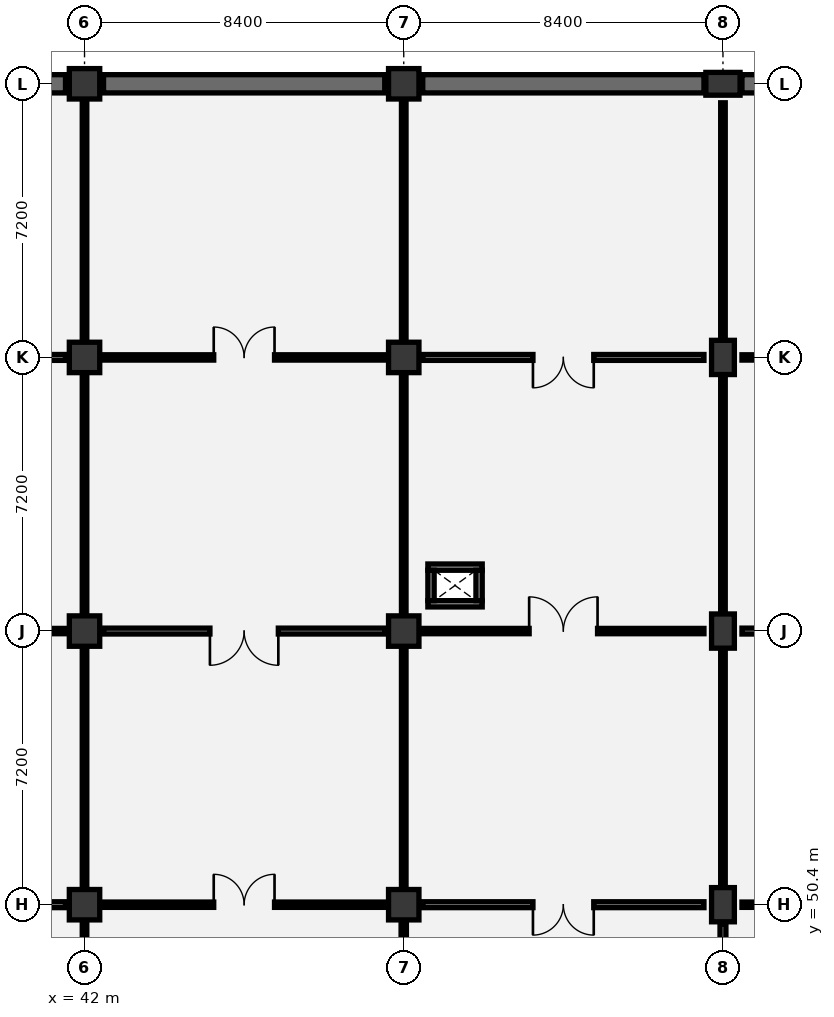
"""IFC4 building model, lengths in metres.
Left out: names, types, materials, properties, quantities, classifications, styles, units other than length and angle.
Written with IfcOpenShell. Run it as: python <this file> out.ifc"""

import sys

from ifc_helpers import new_model, si_unit, direction, frame, frame_2d, origin, origin_2d, place, context, subcontext, project, spatial, rectangle, extrude, element, fill, save


model = new_model("IFC4")
c1 = context("Model", 3, precision=1e-05, world=origin(), true_north=direction((0.0, 1.0)))
c2 = subcontext(c1, "Body", "Model", "MODEL_VIEW")
j1 = project(units=[si_unit("LENGTHUNIT", "METRE"), si_unit("PLANEANGLEUNIT", "RADIAN")], contexts=[c1])
p1 = place(None, origin())
s1 = spatial("IfcSite", under=j1, at=p1, CompositionType="ELEMENT")
p2 = place(p1, origin())
s2 = spatial("IfcBuilding", under=s1, at=p2, CompositionType="ELEMENT")
p3 = place(p2, frame((0.0, 0.0, -4.8)))
s3 = spatial("IfcBuildingStorey", under=s2, at=p3, CompositionType="ELEMENT", Elevation=-4.8)
for number, where, z_axis, x_axis in (
    (1, (42.0, 50.4, 0.0), (0.0, 0.0, 1.0), (1.0, 0.0, 0.0)),
    (2, (42.0, 57.6, 0.0), (0.0, 0.0, 1.0), (1.0, 0.0, 0.0)),
    (3, (42.0, 64.8, 0.0), (0.0, 0.0, 1.0), (1.0, 0.0, 0.0)),
    (4, (42.0, 72.0, 0.0), (0.0, 0.0, 1.0), (1.0, 0.0, 0.0)),
    (5, (50.4, 50.4, 0.0), (0.0, 0.0, 1.0), (1.0, 0.0, 0.0)),
    (6, (50.4, 57.6, 0.0), (0.0, 0.0, 1.0), (1.0, 0.0, 0.0)),
    (7, (50.4, 64.8, 0.0), (0.0, 0.0, 1.0), (1.0, 0.0, 0.0)),
    (8, (50.4, 72.0, 0.0), (0.0, 0.0, 1.0), (1.0, 0.0, 0.0)),
):
    element("IfcColumn", number, at=place(p3, frame(where, z_axis=z_axis, x_axis=x_axis)), inside=s3, PredefinedType="COLUMN", context=c2, shape_type="SweptSolid", body=[
        extrude(rectangle(XDim=0.8, YDim=0.8, at=origin_2d()), origin(), (0.0, 0.0, 1.0), 4.8),
    ])
for number, where, z_axis, x_axis in (
    (9, (58.8, 50.4, 0.0), (0.0, 0.0, 1.0), (1.0, 0.0, 0.0)),
    (10, (58.8, 57.6, 0.0), (0.0, 0.0, 1.0), (1.0, 0.0, 0.0)),
    (11, (58.8, 64.8, 0.0), (0.0, 0.0, 1.0), (1.0, 0.0, 0.0)),
    (12, (58.8, 72.0, 0.0), (0.0, 0.0, 1.0), (0.0, 1.0, 0.0)),
):
    element("IfcColumn", number, at=place(p3, frame(where, z_axis=z_axis, x_axis=x_axis)), inside=s3, PredefinedType="COLUMN", context=c2, shape_type="SweptSolid", body=[
        extrude(rectangle(XDim=0.6, YDim=0.9, at=origin_2d()), origin(), (0.0, 0.0, 1.0), 4.8),
    ])
for number, where, z_axis, x_axis in (
    (13, (34.1, 72.0, 0.0), (0.0, 0.0, 1.0), (1.0, 0.0, 0.0)),
    (14, (42.5, 72.0, 0.0), (0.0, 0.0, 1.0), (1.0, 0.0, 0.0)),
):
    element("IfcWall", number, at=place(p3, frame(where, z_axis=z_axis, x_axis=x_axis)), inside=s3, PredefinedType="USERDEFINED", context=c2, shape_type="SweptSolid", body=[
        extrude(rectangle(XDim=7.4, YDim=0.48, at=frame_2d((3.7, 0.0))), origin(), (0.0, 0.0, 1.0), 4.45),
    ])
p4 = place(p3, frame((50.9, 72.0, 0.0), z_axis=(0.0, 0.0, 1.0), x_axis=(1.0, 0.0, 0.0)))
e15 = element("IfcWall", 15, at=p4, inside=s3, PredefinedType="USERDEFINED", context=c2, shape_type="SweptSolid", body=[
    extrude(rectangle(XDim=7.4, YDim=0.48, at=frame_2d((3.7, 0.0))), origin(), (0.0, 0.0, 1.0), 4.45),
])
p5 = place(p3, frame((59.3, 72.0, 0.0), z_axis=(0.0, 0.0, 1.0), x_axis=(1.0, 0.0, 0.0)))
e16 = element("IfcWall", 16, at=p5, inside=s3, PredefinedType="USERDEFINED", context=c2, shape_type="SweptSolid", body=[
    extrude(rectangle(XDim=7.4, YDim=0.48, at=frame_2d((3.7, 0.0))), origin(), (0.0, 0.0, 1.0), 4.45),
])
for number, where, z_axis, x_axis in (
    (17, (51.035, 58.317, 0.0), (0.0, 0.0, 1.0), (1.0, 0.0, 0.0)),
    (18, (51.035, 59.282, 0.0), (0.0, 0.0, 1.0), (1.0, 0.0, 0.0)),
):
    element("IfcWall", number, at=place(p3, frame(where, z_axis=z_axis, x_axis=x_axis)), inside=s3, PredefinedType="PARTITIONING", context=c2, shape_type="SweptSolid", body=[
        extrude(rectangle(XDim=1.43, YDim=0.165, at=frame_2d((0.715, 0.0))), origin(), (0.0, 0.0, 1.0), 4.45),
    ])
for number, where, z_axis, x_axis in (
    (19, (51.117, 58.4, 0.0), (0.0, 0.0, 1.0), (0.0, 1.0, 0.0)),
    (20, (52.383, 58.4, 0.0), (0.0, 0.0, 1.0), (0.0, 1.0, 0.0)),
):
    element("IfcWall", number, at=place(p3, frame(where, z_axis=z_axis, x_axis=x_axis)), inside=s3, PredefinedType="PARTITIONING", context=c2, shape_type="SweptSolid", body=[
        extrude(rectangle(XDim=0.8, YDim=0.165, at=frame_2d((0.4, 0.0))), origin(), (0.0, 0.0, 1.0), 4.45),
    ])
p6 = place(p3, frame((42.0, 43.7, 0.0), z_axis=(0.0, 0.0, 1.0), x_axis=(0.0, 1.0, 0.0)))
e21 = element("IfcWall", 21, at=p6, inside=s3, PredefinedType="PARTITIONING", context=c2, shape_type="SweptSolid", body=[
    extrude(rectangle(XDim=6.2, YDim=0.12, at=frame_2d((3.1, 0.0))), origin(), (0.0, 0.0, 1.0), 3.645),
])
p7 = place(p3, frame((34.1, 50.4, 0.0), z_axis=(0.0, 0.0, 1.0), x_axis=(1.0, 0.0, 0.0)))
e22 = element("IfcWall", 22, at=p7, inside=s3, PredefinedType="PARTITIONING", context=c2, shape_type="SweptSolid", body=[
    extrude(rectangle(XDim=7.4, YDim=0.155, at=frame_2d((3.7, 0.0))), origin(), (0.0, 0.0, 1.0), 3.545),
])
p8 = place(p7, frame((2.9, 0.0, 0.0)))
e23 = element("IfcOpeningElement", 23, at=p8, cuts=e22, PredefinedType="OPENING", context=c2, shape_type="SweptSolid", body=[
    extrude(rectangle(XDim=1.6, YDim=2.2, at=frame_2d((0.8, 1.1))), frame((0.0, 0.087, 0.0), z_axis=(0.0, -1.0, 0.0), x_axis=(1.0, 0.0, 0.0)), (0.0, 0.0, 1.0), 0.175),
])
p9 = place(p3, frame((42.0, 50.9, 0.0), z_axis=(0.0, 0.0, 1.0), x_axis=(0.0, 1.0, 0.0)))
e24 = element("IfcWall", 24, at=p9, inside=s3, PredefinedType="PARTITIONING", context=c2, shape_type="SweptSolid", body=[
    extrude(rectangle(XDim=6.2, YDim=0.12, at=frame_2d((3.1, 0.0))), origin(), (0.0, 0.0, 1.0), 3.645),
])
p10 = place(p3, frame((34.1, 57.6, 0.0), z_axis=(0.0, 0.0, 1.0), x_axis=(1.0, 0.0, 0.0)))
e25 = element("IfcWall", 25, at=p10, inside=s3, PredefinedType="PARTITIONING", context=c2, shape_type="SweptSolid", body=[
    extrude(rectangle(XDim=7.4, YDim=0.14, at=frame_2d((3.7, 0.0))), origin(), (0.0, 0.0, 1.0), 3.545),
])
p11 = place(p10, frame((2.8, 0.0, 0.0)))
e26 = element("IfcOpeningElement", 26, at=p11, cuts=e25, PredefinedType="OPENING", context=c2, shape_type="SweptSolid", body=[
    extrude(rectangle(XDim=1.8, YDim=2.25, at=frame_2d((0.9, 1.125))), frame((0.0, 0.08, 0.0), z_axis=(0.0, -1.0, 0.0), x_axis=(1.0, 0.0, 0.0)), (0.0, 0.0, 1.0), 0.16),
])
p12 = place(p3, frame((42.0, 58.1, 0.0), z_axis=(0.0, 0.0, 1.0), x_axis=(0.0, 1.0, 0.0)))
e27 = element("IfcWall", 27, at=p12, inside=s3, PredefinedType="PARTITIONING", context=c2, shape_type="SweptSolid", body=[
    extrude(rectangle(XDim=6.2, YDim=0.12, at=frame_2d((3.1, 0.0))), origin(), (0.0, 0.0, 1.0), 3.645),
])
p13 = place(p3, frame((34.1, 64.8, 0.0), z_axis=(0.0, 0.0, 1.0), x_axis=(1.0, 0.0, 0.0)))
e28 = element("IfcWall", 28, at=p13, inside=s3, PredefinedType="PARTITIONING", context=c2, shape_type="SweptSolid", body=[
    extrude(rectangle(XDim=7.4, YDim=0.155, at=frame_2d((3.7, 0.0))), origin(), (0.0, 0.0, 1.0), 3.545),
])
p14 = place(p13, frame((2.9, 0.0, 0.0)))
e29 = element("IfcOpeningElement", 29, at=p14, cuts=e28, PredefinedType="OPENING", context=c2, shape_type="SweptSolid", body=[
    extrude(rectangle(XDim=1.6, YDim=2.2, at=frame_2d((0.8, 1.1))), frame((0.0, 0.087, 0.0), z_axis=(0.0, -1.0, 0.0), x_axis=(1.0, 0.0, 0.0)), (0.0, 0.0, 1.0), 0.175),
])
p15 = place(p3, frame((42.0, 65.3, 0.0), z_axis=(0.0, 0.0, 1.0), x_axis=(0.0, 1.0, 0.0)))
e30 = element("IfcWall", 30, at=p15, inside=s3, PredefinedType="PARTITIONING", context=c2, shape_type="SweptSolid", body=[
    extrude(rectangle(XDim=6.2, YDim=0.12, at=frame_2d((3.1, 0.0))), origin(), (0.0, 0.0, 1.0), 3.645),
])
p16 = place(p3, frame((50.4, 43.7, 0.0), z_axis=(0.0, 0.0, 1.0), x_axis=(0.0, 1.0, 0.0)))
e31 = element("IfcWall", 31, at=p16, inside=s3, PredefinedType="PARTITIONING", context=c2, shape_type="SweptSolid", body=[
    extrude(rectangle(XDim=6.2, YDim=0.14, at=frame_2d((3.1, 0.0))), origin(), (0.0, 0.0, 1.0), 3.645),
])
p17 = place(p16, frame((2.2, 0.0, 0.0)))
e32 = element("IfcOpeningElement", 32, at=p17, cuts=e31, PredefinedType="OPENING", context=c2, shape_type="SweptSolid", body=[
    extrude(rectangle(XDim=1.8, YDim=2.25, at=frame_2d((0.9, 1.125))), frame((0.0, 0.08, 0.0), z_axis=(0.0, -1.0, 0.0), x_axis=(1.0, 0.0, 0.0)), (0.0, 0.0, 1.0), 0.16),
])
p18 = place(p3, frame((42.5, 50.4, 0.0), z_axis=(0.0, 0.0, 1.0), x_axis=(1.0, 0.0, 0.0)))
e33 = element("IfcWall", 33, at=p18, inside=s3, PredefinedType="PARTITIONING", context=c2, shape_type="SweptSolid", body=[
    extrude(rectangle(XDim=7.4, YDim=0.14, at=frame_2d((3.7, 0.0))), origin(), (0.0, 0.0, 1.0), 3.545),
])
p19 = place(p18, frame((2.9, 0.0, 0.0)))
e34 = element("IfcOpeningElement", 34, at=p19, cuts=e33, PredefinedType="OPENING", context=c2, shape_type="SweptSolid", body=[
    extrude(rectangle(XDim=1.6, YDim=2.2, at=frame_2d((0.8, 1.1))), frame((0.0, 0.08, 0.0), z_axis=(0.0, -1.0, 0.0), x_axis=(1.0, 0.0, 0.0)), (0.0, 0.0, 1.0), 0.16),
])
p20 = place(p3, frame((50.4, 50.9, 0.0), z_axis=(0.0, 0.0, 1.0), x_axis=(0.0, 1.0, 0.0)))
e35 = element("IfcWall", 35, at=p20, inside=s3, PredefinedType="PARTITIONING", context=c2, shape_type="SweptSolid", body=[
    extrude(rectangle(XDim=6.2, YDim=0.12, at=frame_2d((3.1, 0.0))), origin(), (0.0, 0.0, 1.0), 3.645),
])
p21 = place(p3, frame((42.5, 57.6, 0.0), z_axis=(0.0, 0.0, 1.0), x_axis=(1.0, 0.0, 0.0)))
e36 = element("IfcWall", 36, at=p21, inside=s3, PredefinedType="PARTITIONING", context=c2, shape_type="SweptSolid", body=[
    extrude(rectangle(XDim=7.4, YDim=0.155, at=frame_2d((3.7, 0.0))), origin(), (0.0, 0.0, 1.0), 3.545),
])
p22 = place(p21, frame((2.8, 0.0, 0.0)))
e37 = element("IfcOpeningElement", 37, at=p22, cuts=e36, PredefinedType="OPENING", context=c2, shape_type="SweptSolid", body=[
    extrude(rectangle(XDim=1.8, YDim=2.25, at=frame_2d((0.9, 1.125))), frame((0.0, 0.087, 0.0), z_axis=(0.0, -1.0, 0.0), x_axis=(1.0, 0.0, 0.0)), (0.0, 0.0, 1.0), 0.175),
])
p23 = place(p3, frame((50.4, 58.1, 0.0), z_axis=(0.0, 0.0, 1.0), x_axis=(0.0, 1.0, 0.0)))
e38 = element("IfcWall", 38, at=p23, inside=s3, PredefinedType="PARTITIONING", context=c2, shape_type="SweptSolid", body=[
    extrude(rectangle(XDim=6.2, YDim=0.12, at=frame_2d((3.1, 0.0))), origin(), (0.0, 0.0, 1.0), 3.645),
])
p24 = place(p3, frame((42.5, 64.8, 0.0), z_axis=(0.0, 0.0, 1.0), x_axis=(1.0, 0.0, 0.0)))
e39 = element("IfcWall", 39, at=p24, inside=s3, PredefinedType="PARTITIONING", context=c2, shape_type="SweptSolid", body=[
    extrude(rectangle(XDim=7.4, YDim=0.14, at=frame_2d((3.7, 0.0))), origin(), (0.0, 0.0, 1.0), 3.545),
])
p25 = place(p24, frame((2.9, 0.0, 0.0)))
e40 = element("IfcOpeningElement", 40, at=p25, cuts=e39, PredefinedType="OPENING", context=c2, shape_type="SweptSolid", body=[
    extrude(rectangle(XDim=1.6, YDim=2.2, at=frame_2d((0.8, 1.1))), frame((0.0, 0.08, 0.0), z_axis=(0.0, -1.0, 0.0), x_axis=(1.0, 0.0, 0.0)), (0.0, 0.0, 1.0), 0.16),
])
p26 = place(p3, frame((50.4, 65.3, 0.0), z_axis=(0.0, 0.0, 1.0), x_axis=(0.0, 1.0, 0.0)))
e41 = element("IfcWall", 41, at=p26, inside=s3, PredefinedType="PARTITIONING", context=c2, shape_type="SweptSolid", body=[
    extrude(rectangle(XDim=6.2, YDim=0.12, at=frame_2d((3.1, 0.0))), origin(), (0.0, 0.0, 1.0), 3.645),
])
p27 = place(p3, frame((58.8, 43.7, 0.0), z_axis=(0.0, 0.0, 1.0), x_axis=(0.0, 1.0, 0.0)))
e42 = element("IfcWall", 42, at=p27, inside=s3, PredefinedType="PARTITIONING", context=c2, shape_type="SweptSolid", body=[
    extrude(rectangle(XDim=6.2, YDim=0.155, at=frame_2d((3.1, 0.0))), origin(), (0.0, 0.0, 1.0), 3.645),
])
p28 = place(p27, frame((2.2, 0.0, 0.0)))
e43 = element("IfcOpeningElement", 43, at=p28, cuts=e42, PredefinedType="OPENING", context=c2, shape_type="SweptSolid", body=[
    extrude(rectangle(XDim=1.8, YDim=2.25, at=frame_2d((0.9, 1.125))), frame((0.0, 0.087, 0.0), z_axis=(0.0, -1.0, 0.0), x_axis=(1.0, 0.0, 0.0)), (0.0, 0.0, 1.0), 0.175),
])
p29 = place(p3, frame((50.9, 50.4, 0.0), z_axis=(0.0, 0.0, 1.0), x_axis=(1.0, 0.0, 0.0)))
e44 = element("IfcWall", 44, at=p29, inside=s3, PredefinedType="PARTITIONING", context=c2, shape_type="SweptSolid", body=[
    extrude(rectangle(XDim=7.4, YDim=0.155, at=frame_2d((3.7, 0.0))), origin(), (0.0, 0.0, 1.0), 3.545),
])
p30 = place(p29, frame((2.9, 0.0, 0.0)))
e45 = element("IfcOpeningElement", 45, at=p30, cuts=e44, PredefinedType="OPENING", context=c2, shape_type="SweptSolid", body=[
    extrude(rectangle(XDim=1.6, YDim=2.2, at=frame_2d((0.8, 1.1))), frame((0.0, 0.087, 0.0), z_axis=(0.0, -1.0, 0.0), x_axis=(1.0, 0.0, 0.0)), (0.0, 0.0, 1.0), 0.175),
])
p31 = place(p3, frame((58.8, 50.9, 0.0), z_axis=(0.0, 0.0, 1.0), x_axis=(0.0, 1.0, 0.0)))
e46 = element("IfcWall", 46, at=p31, inside=s3, PredefinedType="PARTITIONING", context=c2, shape_type="SweptSolid", body=[
    extrude(rectangle(XDim=6.2, YDim=0.12, at=frame_2d((3.1, 0.0))), origin(), (0.0, 0.0, 1.0), 3.645),
])
p32 = place(p3, frame((50.9, 57.6, 0.0), z_axis=(0.0, 0.0, 1.0), x_axis=(1.0, 0.0, 0.0)))
e47 = element("IfcWall", 47, at=p32, inside=s3, PredefinedType="PARTITIONING", context=c2, shape_type="SweptSolid", body=[
    extrude(rectangle(XDim=7.4, YDim=0.14, at=frame_2d((3.7, 0.0))), origin(), (0.0, 0.0, 1.0), 3.545),
])
p33 = place(p32, frame((2.8, 0.0, 0.0)))
e48 = element("IfcOpeningElement", 48, at=p33, cuts=e47, PredefinedType="OPENING", context=c2, shape_type="SweptSolid", body=[
    extrude(rectangle(XDim=1.8, YDim=2.25, at=frame_2d((0.9, 1.125))), frame((0.0, 0.08, 0.0), z_axis=(0.0, -1.0, 0.0), x_axis=(1.0, 0.0, 0.0)), (0.0, 0.0, 1.0), 0.16),
])
p34 = place(p3, frame((58.8, 58.1, 0.0), z_axis=(0.0, 0.0, 1.0), x_axis=(0.0, 1.0, 0.0)))
e49 = element("IfcWall", 49, at=p34, inside=s3, PredefinedType="PARTITIONING", context=c2, shape_type="SweptSolid", body=[
    extrude(rectangle(XDim=6.2, YDim=0.12, at=frame_2d((3.1, 0.0))), origin(), (0.0, 0.0, 1.0), 3.645),
])
p35 = place(p3, frame((50.9, 64.8, 0.0), z_axis=(0.0, 0.0, 1.0), x_axis=(1.0, 0.0, 0.0)))
e50 = element("IfcWall", 50, at=p35, inside=s3, PredefinedType="PARTITIONING", context=c2, shape_type="SweptSolid", body=[
    extrude(rectangle(XDim=7.4, YDim=0.155, at=frame_2d((3.7, 0.0))), origin(), (0.0, 0.0, 1.0), 3.545),
])
p36 = place(p35, frame((2.9, 0.0, 0.0)))
e51 = element("IfcOpeningElement", 51, at=p36, cuts=e50, PredefinedType="OPENING", context=c2, shape_type="SweptSolid", body=[
    extrude(rectangle(XDim=1.6, YDim=2.2, at=frame_2d((0.8, 1.1))), frame((0.0, 0.087, 0.0), z_axis=(0.0, -1.0, 0.0), x_axis=(1.0, 0.0, 0.0)), (0.0, 0.0, 1.0), 0.175),
])
p37 = place(p3, frame((58.8, 65.3, 0.0), z_axis=(0.0, 0.0, 1.0), x_axis=(0.0, 1.0, 0.0)))
e52 = element("IfcWall", 52, at=p37, inside=s3, PredefinedType="PARTITIONING", context=c2, shape_type="SweptSolid", body=[
    extrude(rectangle(XDim=6.2, YDim=0.12, at=frame_2d((3.1, 0.0))), origin(), (0.0, 0.0, 1.0), 3.645),
])
p38 = place(p3, frame((59.3, 50.4, 0.0), z_axis=(0.0, 0.0, 1.0), x_axis=(1.0, 0.0, 0.0)))
e53 = element("IfcWall", 53, at=p38, inside=s3, PredefinedType="PARTITIONING", context=c2, shape_type="SweptSolid", body=[
    extrude(rectangle(XDim=7.4, YDim=0.14, at=frame_2d((3.7, 0.0))), origin(), (0.0, 0.0, 1.0), 3.545),
])
p39 = place(p38, frame((2.9, 0.0, 0.0)))
e54 = element("IfcOpeningElement", 54, at=p39, cuts=e53, PredefinedType="OPENING", context=c2, shape_type="SweptSolid", body=[
    extrude(rectangle(XDim=1.6, YDim=2.2, at=frame_2d((0.8, 1.1))), frame((0.0, 0.08, 0.0), z_axis=(0.0, -1.0, 0.0), x_axis=(1.0, 0.0, 0.0)), (0.0, 0.0, 1.0), 0.16),
])
p40 = place(p3, frame((59.3, 57.6, 0.0), z_axis=(0.0, 0.0, 1.0), x_axis=(1.0, 0.0, 0.0)))
e55 = element("IfcWall", 55, at=p40, inside=s3, PredefinedType="PARTITIONING", context=c2, shape_type="SweptSolid", body=[
    extrude(rectangle(XDim=7.4, YDim=0.155, at=frame_2d((3.7, 0.0))), origin(), (0.0, 0.0, 1.0), 3.545),
])
p41 = place(p40, frame((2.8, 0.0, 0.0)))
e56 = element("IfcOpeningElement", 56, at=p41, cuts=e55, PredefinedType="OPENING", context=c2, shape_type="SweptSolid", body=[
    extrude(rectangle(XDim=1.8, YDim=2.25, at=frame_2d((0.9, 1.125))), frame((0.0, 0.087, 0.0), z_axis=(0.0, -1.0, 0.0), x_axis=(1.0, 0.0, 0.0)), (0.0, 0.0, 1.0), 0.175),
])
p42 = place(p3, frame((59.3, 64.8, 0.0), z_axis=(0.0, 0.0, 1.0), x_axis=(1.0, 0.0, 0.0)))
e57 = element("IfcWall", 57, at=p42, inside=s3, PredefinedType="PARTITIONING", context=c2, shape_type="SweptSolid", body=[
    extrude(rectangle(XDim=7.4, YDim=0.14, at=frame_2d((3.7, 0.0))), origin(), (0.0, 0.0, 1.0), 3.545),
])
p43 = place(p42, frame((2.8, 0.0, 0.0)))
e58 = element("IfcOpeningElement", 58, at=p43, cuts=e57, PredefinedType="OPENING", context=c2, shape_type="SweptSolid", body=[
    extrude(rectangle(XDim=1.8, YDim=2.25, at=frame_2d((0.9, 1.125))), frame((0.0, 0.08, 0.0), z_axis=(0.0, -1.0, 0.0), x_axis=(1.0, 0.0, 0.0)), (0.0, 0.0, 1.0), 0.16),
])
p44 = place(p19, origin())
e59 = element("IfcDoor", 59, at=p44, inside=s3, OperationType="DOUBLE_DOOR_SINGLE_SWING", PredefinedType="DOOR", context=c2, shape_type="SweptSolid", body=[
    extrude(rectangle(XDim=1.6, YDim=2.2, at=frame_2d((0.8, 1.1))), frame((0.0, 0.025, 0.0), z_axis=(0.0, -1.0, 0.0), x_axis=(1.0, 0.0, 0.0)), (0.0, 0.0, 1.0), 0.05),
])
fill(e34, e59)
p45 = place(p22, frame((1.8, 0.0, 0.0), z_axis=(0.0, 0.0, 1.0), x_axis=(-1.0, 0.0, 0.0)))
e60 = element("IfcDoor", 60, at=p45, inside=s3, OperationType="DOUBLE_DOOR_SINGLE_SWING", PredefinedType="DOOR", context=c2, shape_type="SweptSolid", body=[
    extrude(rectangle(XDim=1.8, YDim=2.25, at=frame_2d((0.9, 1.125))), frame((0.0, 0.025, 0.0), z_axis=(0.0, -1.0, 0.0), x_axis=(1.0, 0.0, 0.0)), (0.0, 0.0, 1.0), 0.05),
])
fill(e37, e60)
p46 = place(p25, origin())
e61 = element("IfcDoor", 61, at=p46, inside=s3, OperationType="DOUBLE_DOOR_SINGLE_SWING", PredefinedType="DOOR", context=c2, shape_type="SweptSolid", body=[
    extrude(rectangle(XDim=1.6, YDim=2.2, at=frame_2d((0.8, 1.1))), frame((0.0, 0.025, 0.0), z_axis=(0.0, -1.0, 0.0), x_axis=(1.0, 0.0, 0.0)), (0.0, 0.0, 1.0), 0.05),
])
fill(e40, e61)
p47 = place(p30, frame((1.6, 0.0, 0.0), z_axis=(0.0, 0.0, 1.0), x_axis=(-1.0, 0.0, 0.0)))
e62 = element("IfcDoor", 62, at=p47, inside=s3, OperationType="DOUBLE_DOOR_SINGLE_SWING", PredefinedType="DOOR", context=c2, shape_type="SweptSolid", body=[
    extrude(rectangle(XDim=1.6, YDim=2.2, at=frame_2d((0.8, 1.1))), frame((0.0, 0.025, 0.0), z_axis=(0.0, -1.0, 0.0), x_axis=(1.0, 0.0, 0.0)), (0.0, 0.0, 1.0), 0.05),
])
fill(e45, e62)
p48 = place(p33, origin())
e63 = element("IfcDoor", 63, at=p48, inside=s3, OperationType="DOUBLE_DOOR_SINGLE_SWING", PredefinedType="DOOR", context=c2, shape_type="SweptSolid", body=[
    extrude(rectangle(XDim=1.8, YDim=2.25, at=frame_2d((0.9, 1.125))), frame((0.0, 0.025, 0.0), z_axis=(0.0, -1.0, 0.0), x_axis=(1.0, 0.0, 0.0)), (0.0, 0.0, 1.0), 0.05),
])
fill(e48, e63)
p49 = place(p36, frame((1.6, 0.0, 0.0), z_axis=(0.0, 0.0, 1.0), x_axis=(-1.0, 0.0, 0.0)))
e64 = element("IfcDoor", 64, at=p49, inside=s3, OperationType="DOUBLE_DOOR_SINGLE_SWING", PredefinedType="DOOR", context=c2, shape_type="SweptSolid", body=[
    extrude(rectangle(XDim=1.6, YDim=2.2, at=frame_2d((0.8, 1.1))), frame((0.0, 0.025, 0.0), z_axis=(0.0, -1.0, 0.0), x_axis=(1.0, 0.0, 0.0)), (0.0, 0.0, 1.0), 0.05),
])
fill(e51, e64)
save(model, sys.argv[1])
